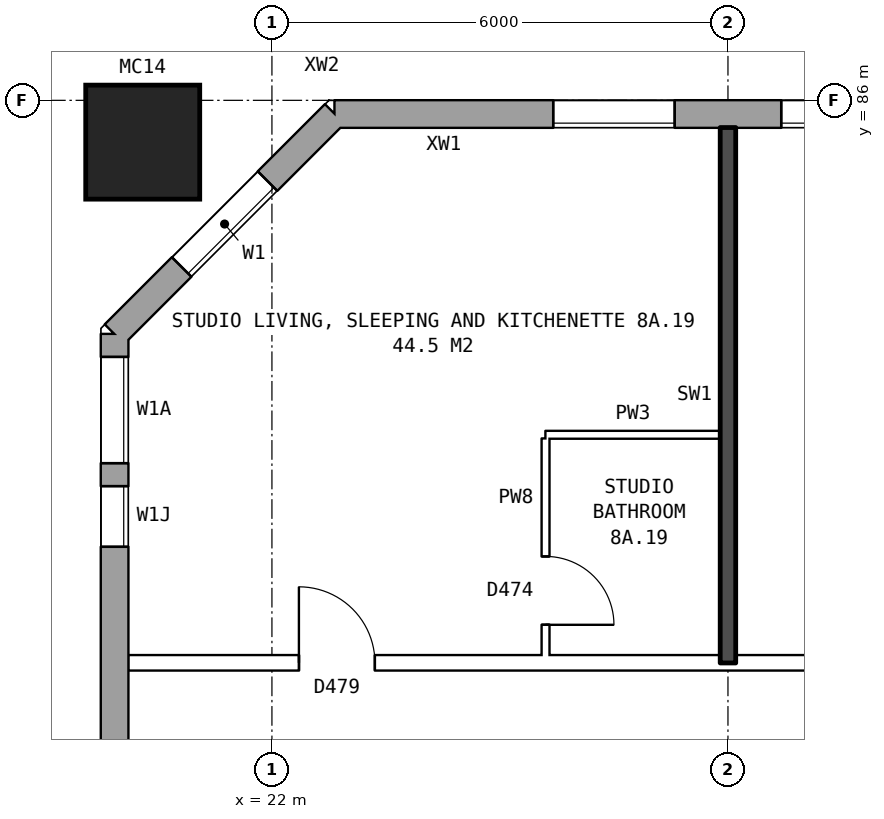
"""IFC4 building model, lengths in metres.
Left out: names, types, materials, properties, quantities, classifications, styles, units other than length and angle.
Written with IfcOpenShell. Run it as: python <this file> out.ifc"""

import sys

from ifc_helpers import new_model, si_unit, direction, frame, frame_2d, origin, origin_2d, place, context, subcontext, project, spatial, rectangle, hollow_rectangle, extrude, element, fill, save


model = new_model("IFC4")
c1 = context("Model", 3, precision=1e-05, world=origin(), true_north=direction((0.0, 1.0)))
c2 = subcontext(c1, "Body", "Model", "MODEL_VIEW")
j1 = project(units=[si_unit("LENGTHUNIT", "METRE"), si_unit("PLANEANGLEUNIT", "RADIAN")], contexts=[c1])
p1 = place(None, origin())
s1 = spatial("IfcSite", under=j1, at=p1, CompositionType="ELEMENT")
p2 = place(p1, origin())
s2 = spatial("IfcBuilding", under=s1, at=p2, CompositionType="ELEMENT")
p3 = place(p2, frame((0.0, 0.0, 31.9)))
s3 = spatial("IfcBuildingStorey", under=s2, at=p3, CompositionType="ELEMENT", Elevation=31.9)
p4 = place(p3, frame((20.3, 85.45, 0.0), z_axis=(0.0, 0.0, 1.0), x_axis=(1.0, 0.0, 0.0)))
e1 = element("IfcColumn", 1, at=p4, inside=s3, PredefinedType="COLUMN", context=c2, shape_type="SweptSolid", body=[
    extrude(hollow_rectangle(XDim=1.5, YDim=1.5, WallThickness=0.08, at=origin_2d()), origin(), (0.0, 0.0, 1.0), 3.1),
])
p5 = place(p3, frame((72.925, 85.82, 0.0), z_axis=(0.0, 0.0, 1.0), x_axis=(-1.0, 0.0, 0.0)))
e2 = element("IfcWall", 2, at=p5, inside=s3, PredefinedType="STANDARD", context=c2, shape_type="SweptSolid", body=[
    extrude(rectangle(XDim=50.101, YDim=0.36, at=frame_2d((25.05, 0.0))), origin(), (0.0, 0.0, 1.0), 2.85),
])
p6 = place(p5, frame((0.625, 0.0, 0.8)))
e3 = element("IfcOpeningElement", 3, at=p6, cuts=e2, PredefinedType="OPENING", context=c2, shape_type="SweptSolid", body=[
    extrude(rectangle(XDim=1.6, YDim=1.8, at=frame_2d((0.8, 0.9))), frame((0.0, 0.19, 0.0), z_axis=(0.0, -1.0, 0.0), x_axis=(1.0, 0.0, 0.0)), (0.0, 0.0, 1.0), 0.38),
])
p7 = place(p5, frame((3.625, 0.0, 0.8)))
e4 = element("IfcOpeningElement", 4, at=p7, cuts=e2, PredefinedType="OPENING", context=c2, shape_type="SweptSolid", body=[
    extrude(rectangle(XDim=1.6, YDim=1.8, at=frame_2d((0.8, 0.9))), frame((0.0, 0.19, 0.0), z_axis=(0.0, -1.0, 0.0), x_axis=(1.0, 0.0, 0.0)), (0.0, 0.0, 1.0), 0.38),
])
p8 = place(p5, frame((6.625, 0.0, 0.8)))
e5 = element("IfcOpeningElement", 5, at=p8, cuts=e2, PredefinedType="OPENING", context=c2, shape_type="SweptSolid", body=[
    extrude(rectangle(XDim=1.6, YDim=1.8, at=frame_2d((0.8, 0.9))), frame((0.0, 0.19, 0.0), z_axis=(0.0, -1.0, 0.0), x_axis=(1.0, 0.0, 0.0)), (0.0, 0.0, 1.0), 0.38),
])
p9 = place(p5, frame((9.625, 0.0, 0.8)))
e6 = element("IfcOpeningElement", 6, at=p9, cuts=e2, PredefinedType="OPENING", context=c2, shape_type="SweptSolid", body=[
    extrude(rectangle(XDim=1.6, YDim=1.8, at=frame_2d((0.8, 0.9))), frame((0.0, 0.19, 0.0), z_axis=(0.0, -1.0, 0.0), x_axis=(1.0, 0.0, 0.0)), (0.0, 0.0, 1.0), 0.38),
])
p10 = place(p5, frame((12.625, 0.0, 0.8)))
e7 = element("IfcOpeningElement", 7, at=p10, cuts=e2, PredefinedType="OPENING", context=c2, shape_type="SweptSolid", body=[
    extrude(rectangle(XDim=1.6, YDim=1.8, at=frame_2d((0.8, 0.9))), frame((0.0, 0.19, 0.0), z_axis=(0.0, -1.0, 0.0), x_axis=(1.0, 0.0, 0.0)), (0.0, 0.0, 1.0), 0.38),
])
p11 = place(p5, frame((15.125, 0.0, 0.8)))
e8 = element("IfcOpeningElement", 8, at=p11, cuts=e2, PredefinedType="OPENING", context=c2, shape_type="SweptSolid", body=[
    extrude(rectangle(XDim=1.6, YDim=1.8, at=frame_2d((0.8, 0.9))), frame((0.0, 0.19, 0.0), z_axis=(0.0, -1.0, 0.0), x_axis=(1.0, 0.0, 0.0)), (0.0, 0.0, 1.0), 0.38),
])
p12 = place(p5, frame((18.575, 0.0, 0.15)))
e9 = element("IfcOpeningElement", 9, at=p12, cuts=e2, PredefinedType="OPENING", context=c2, shape_type="SweptSolid", body=[
    extrude(rectangle(XDim=0.6, YDim=0.9, at=frame_2d((0.3, 0.45))), frame((0.0, 0.19, 0.0), z_axis=(0.0, -1.0, 0.0), x_axis=(1.0, 0.0, 0.0)), (0.0, 0.0, 1.0), 0.38),
])
p13 = place(p5, frame((21.625, 0.0, 0.8)))
e10 = element("IfcOpeningElement", 10, at=p13, cuts=e2, PredefinedType="OPENING", context=c2, shape_type="SweptSolid", body=[
    extrude(rectangle(XDim=1.6, YDim=1.8, at=frame_2d((0.8, 0.9))), frame((0.0, 0.19, 0.0), z_axis=(0.0, -1.0, 0.0), x_axis=(1.0, 0.0, 0.0)), (0.0, 0.0, 1.0), 0.38),
])
p14 = place(p5, frame((24.625, 0.0, 0.8)))
e11 = element("IfcOpeningElement", 11, at=p14, cuts=e2, PredefinedType="OPENING", context=c2, shape_type="SweptSolid", body=[
    extrude(rectangle(XDim=1.6, YDim=1.8, at=frame_2d((0.8, 0.9))), frame((0.0, 0.19, 0.0), z_axis=(0.0, -1.0, 0.0), x_axis=(1.0, 0.0, 0.0)), (0.0, 0.0, 1.0), 0.38),
])
p15 = place(p5, frame((27.625, 0.0, 0.8)))
e12 = element("IfcOpeningElement", 12, at=p15, cuts=e2, PredefinedType="OPENING", context=c2, shape_type="SweptSolid", body=[
    extrude(rectangle(XDim=1.6, YDim=1.8, at=frame_2d((0.8, 0.9))), frame((0.0, 0.19, 0.0), z_axis=(0.0, -1.0, 0.0), x_axis=(1.0, 0.0, 0.0)), (0.0, 0.0, 1.0), 0.38),
])
p16 = place(p5, frame((29.525, 0.0, 0.8)))
e13 = element("IfcOpeningElement", 13, at=p16, cuts=e2, PredefinedType="OPENING", context=c2, shape_type="SweptSolid", body=[
    extrude(rectangle(XDim=1.0, YDim=0.9, at=frame_2d((0.5, 0.45))), frame((0.0, 0.19, 0.0), z_axis=(0.0, -1.0, 0.0), x_axis=(1.0, 0.0, 0.0)), (0.0, 0.0, 1.0), 0.38),
])
p17 = place(p5, frame((33.625, 0.0, 0.8)))
e14 = element("IfcOpeningElement", 14, at=p17, cuts=e2, PredefinedType="OPENING", context=c2, shape_type="SweptSolid", body=[
    extrude(rectangle(XDim=1.6, YDim=1.8, at=frame_2d((0.8, 0.9))), frame((0.0, 0.19, 0.0), z_axis=(0.0, -1.0, 0.0), x_axis=(1.0, 0.0, 0.0)), (0.0, 0.0, 1.0), 0.38),
])
p18 = place(p5, frame((36.625, 0.0, 0.8)))
e15 = element("IfcOpeningElement", 15, at=p18, cuts=e2, PredefinedType="OPENING", context=c2, shape_type="SweptSolid", body=[
    extrude(rectangle(XDim=1.6, YDim=1.8, at=frame_2d((0.8, 0.9))), frame((0.0, 0.19, 0.0), z_axis=(0.0, -1.0, 0.0), x_axis=(1.0, 0.0, 0.0)), (0.0, 0.0, 1.0), 0.38),
])
p19 = place(p5, frame((39.625, 0.0, 0.8)))
e16 = element("IfcOpeningElement", 16, at=p19, cuts=e2, PredefinedType="OPENING", context=c2, shape_type="SweptSolid", body=[
    extrude(rectangle(XDim=1.6, YDim=1.8, at=frame_2d((0.8, 0.9))), frame((0.0, 0.19, 0.0), z_axis=(0.0, -1.0, 0.0), x_axis=(1.0, 0.0, 0.0)), (0.0, 0.0, 1.0), 0.38),
])
p20 = place(p5, frame((42.625, 0.0, 0.8)))
e17 = element("IfcOpeningElement", 17, at=p20, cuts=e2, PredefinedType="OPENING", context=c2, shape_type="SweptSolid", body=[
    extrude(rectangle(XDim=1.6, YDim=1.8, at=frame_2d((0.8, 0.9))), frame((0.0, 0.19, 0.0), z_axis=(0.0, -1.0, 0.0), x_axis=(1.0, 0.0, 0.0)), (0.0, 0.0, 1.0), 0.38),
])
p21 = place(p5, frame((45.625, 0.0, 0.8)))
e18 = element("IfcOpeningElement", 18, at=p21, cuts=e2, PredefinedType="OPENING", context=c2, shape_type="SweptSolid", body=[
    extrude(rectangle(XDim=1.6, YDim=1.8, at=frame_2d((0.8, 0.9))), frame((0.0, 0.19, 0.0), z_axis=(0.0, -1.0, 0.0), x_axis=(1.0, 0.0, 0.0)), (0.0, 0.0, 1.0), 0.38),
])
p22 = place(p5, frame((17.025, 0.0, 1.4)))
e19 = element("IfcOpeningElement", 19, at=p22, cuts=e2, PredefinedType="OPENING", context=c2, shape_type="SweptSolid", body=[
    extrude(rectangle(XDim=0.6, YDim=1.2, at=frame_2d((0.3, 0.6))), frame((0.0, 0.19, 0.0), z_axis=(0.0, -1.0, 0.0), x_axis=(1.0, 0.0, 0.0)), (0.0, 0.0, 1.0), 0.38),
])
p23 = place(p5, frame((19.475, 0.0, 0.15)))
e20 = element("IfcOpeningElement", 20, at=p23, cuts=e2, PredefinedType="OPENING", context=c2, shape_type="SweptSolid", body=[
    extrude(rectangle(XDim=1.2, YDim=1.5, at=frame_2d((0.6, 0.75))), frame((0.0, 0.19, 0.0), z_axis=(0.0, -1.0, 0.0), x_axis=(1.0, 0.0, 0.0)), (0.0, 0.0, 1.0), 0.38),
])
p24 = place(p5, frame((31.975, 0.0, 1.7)))
e21 = element("IfcOpeningElement", 21, at=p24, cuts=e2, PredefinedType="OPENING", context=c2, shape_type="SweptSolid", body=[
    extrude(rectangle(XDim=0.6, YDim=0.9, at=frame_2d((0.3, 0.45))), frame((0.0, 0.19, 0.0), z_axis=(0.0, -1.0, 0.0), x_axis=(1.0, 0.0, 0.0)), (0.0, 0.0, 1.0), 0.38),
])
p25 = place(p3, frame((22.825, 85.82, 0.0), z_axis=(0.0, 0.0, 1.0), x_axis=(-0.707106781187, -0.707106781187, 0.0)))
e22 = element("IfcWall", 22, at=p25, inside=s3, PredefinedType="STANDARD", context=c2, shape_type="SweptSolid", body=[
    extrude(rectangle(XDim=4.094, YDim=0.36, at=frame_2d((2.047, 0.0))), origin(), (0.0, 0.0, 1.0), 2.85),
])
p26 = place(p25, frame((1.247, 0.0, 0.8)))
e23 = element("IfcOpeningElement", 23, at=p26, cuts=e22, PredefinedType="OPENING", context=c2, shape_type="SweptSolid", body=[
    extrude(rectangle(XDim=1.6, YDim=1.8, at=frame_2d((0.8, 0.9))), frame((0.0, 0.19, 0.0), z_axis=(0.0, -1.0, 0.0), x_axis=(1.0, 0.0, 0.0)), (0.0, 0.0, 1.0), 0.38),
])
p27 = place(p3, frame((19.93, 82.925, 0.0), z_axis=(0.0, 0.0, 1.0), x_axis=(0.0, -1.0, 0.0)))
e24 = element("IfcWall", 24, at=p27, inside=s3, PredefinedType="STANDARD", context=c2, shape_type="SweptSolid", body=[
    extrude(rectangle(XDim=25.851, YDim=0.36, at=frame_2d((12.925, 0.0))), origin(), (0.0, 0.0, 1.0), 2.85),
])
p28 = place(p27, frame((0.3, 0.0, 0.8)))
e25 = element("IfcOpeningElement", 25, at=p28, cuts=e24, PredefinedType="OPENING", context=c2, shape_type="SweptSolid", body=[
    extrude(rectangle(XDim=1.4, YDim=1.8, at=frame_2d((0.7, 0.9))), frame((0.0, 0.19, 0.0), z_axis=(0.0, -1.0, 0.0), x_axis=(1.0, 0.0, 0.0)), (0.0, 0.0, 1.0), 0.38),
])
p29 = place(p27, frame((5.575, 0.0, 1.4)))
e26 = element("IfcOpeningElement", 26, at=p29, cuts=e24, PredefinedType="OPENING", context=c2, shape_type="SweptSolid", body=[
    extrude(rectangle(XDim=1.6, YDim=1.2, at=frame_2d((0.8, 0.6))), frame((0.0, 0.19, 0.0), z_axis=(0.0, -1.0, 0.0), x_axis=(1.0, 0.0, 0.0)), (0.0, 0.0, 1.0), 0.38),
])
p30 = place(p27, frame((7.625, 0.0, 0.8)))
e27 = element("IfcOpeningElement", 27, at=p30, cuts=e24, PredefinedType="OPENING", context=c2, shape_type="SweptSolid", body=[
    extrude(rectangle(XDim=1.6, YDim=1.8, at=frame_2d((0.8, 0.9))), frame((0.0, 0.19, 0.0), z_axis=(0.0, -1.0, 0.0), x_axis=(1.0, 0.0, 0.0)), (0.0, 0.0, 1.0), 0.38),
])
p31 = place(p27, frame((10.625, 0.0, 0.8)))
e28 = element("IfcOpeningElement", 28, at=p31, cuts=e24, PredefinedType="OPENING", context=c2, shape_type="SweptSolid", body=[
    extrude(rectangle(XDim=1.6, YDim=1.8, at=frame_2d((0.8, 0.9))), frame((0.0, 0.19, 0.0), z_axis=(0.0, -1.0, 0.0), x_axis=(1.0, 0.0, 0.0)), (0.0, 0.0, 1.0), 0.38),
])
p32 = place(p27, frame((13.625, 0.0, 0.8)))
e29 = element("IfcOpeningElement", 29, at=p32, cuts=e24, PredefinedType="OPENING", context=c2, shape_type="SweptSolid", body=[
    extrude(rectangle(XDim=1.6, YDim=1.8, at=frame_2d((0.8, 0.9))), frame((0.0, 0.19, 0.0), z_axis=(0.0, -1.0, 0.0), x_axis=(1.0, 0.0, 0.0)), (0.0, 0.0, 1.0), 0.38),
])
p33 = place(p27, frame((16.625, 0.0, 0.8)))
e30 = element("IfcOpeningElement", 30, at=p33, cuts=e24, PredefinedType="OPENING", context=c2, shape_type="SweptSolid", body=[
    extrude(rectangle(XDim=1.6, YDim=1.8, at=frame_2d((0.8, 0.9))), frame((0.0, 0.19, 0.0), z_axis=(0.0, -1.0, 0.0), x_axis=(1.0, 0.0, 0.0)), (0.0, 0.0, 1.0), 0.38),
])
p34 = place(p27, frame((9.525, 0.0, 0.8)))
e31 = element("IfcOpeningElement", 31, at=p34, cuts=e24, PredefinedType="OPENING", context=c2, shape_type="SweptSolid", body=[
    extrude(rectangle(XDim=0.8, YDim=1.8, at=frame_2d((0.4, 0.9))), frame((0.0, 0.19, 0.0), z_axis=(0.0, -1.0, 0.0), x_axis=(1.0, 0.0, 0.0)), (0.0, 0.0, 1.0), 0.38),
])
p35 = place(p27, frame((22.525, 0.0, 0.8)))
e32 = element("IfcOpeningElement", 32, at=p35, cuts=e24, PredefinedType="OPENING", context=c2, shape_type="SweptSolid", body=[
    extrude(rectangle(XDim=1.0, YDim=1.2, at=frame_2d((0.5, 0.6))), frame((0.0, 0.19, 0.0), z_axis=(0.0, -1.0, 0.0), x_axis=(1.0, 0.0, 0.0)), (0.0, 0.0, 1.0), 0.38),
])
p36 = place(p27, frame((2.0, 0.0, 0.8)))
e33 = element("IfcOpeningElement", 33, at=p36, cuts=e24, PredefinedType="OPENING", context=c2, shape_type="SweptSolid", body=[
    extrude(rectangle(XDim=0.8, YDim=1.5, at=frame_2d((0.4, 0.75))), frame((0.0, 0.19, 0.0), z_axis=(0.0, -1.0, 0.0), x_axis=(1.0, 0.0, 0.0)), (0.0, 0.0, 1.0), 0.38),
])
p37 = place(p27, frame((12.525, 0.0, 0.8)))
e34 = element("IfcOpeningElement", 34, at=p37, cuts=e24, PredefinedType="OPENING", context=c2, shape_type="SweptSolid", body=[
    extrude(rectangle(XDim=0.8, YDim=1.8, at=frame_2d((0.4, 0.9))), frame((0.0, 0.19, 0.0), z_axis=(0.0, -1.0, 0.0), x_axis=(1.0, 0.0, 0.0)), (0.0, 0.0, 1.0), 0.38),
])
p38 = place(p27, frame((15.525, 0.0, 0.8)))
e35 = element("IfcOpeningElement", 35, at=p38, cuts=e24, PredefinedType="OPENING", context=c2, shape_type="SweptSolid", body=[
    extrude(rectangle(XDim=0.8, YDim=1.8, at=frame_2d((0.4, 0.9))), frame((0.0, 0.19, 0.0), z_axis=(0.0, -1.0, 0.0), x_axis=(1.0, 0.0, 0.0)), (0.0, 0.0, 1.0), 0.38),
])
p39 = place(p27, frame((18.525, 0.0, 0.9)))
e36 = element("IfcOpeningElement", 36, at=p39, cuts=e24, PredefinedType="OPENING", context=c2, shape_type="SweptSolid", body=[
    extrude(rectangle(XDim=0.8, YDim=1.5, at=frame_2d((0.4, 0.75))), frame((0.0, 0.19, 0.0), z_axis=(0.0, -1.0, 0.0), x_axis=(1.0, 0.0, 0.0)), (0.0, 0.0, 1.0), 0.38),
])
p40 = place(p27, frame((23.825, 0.0, 0.8)))
e37 = element("IfcOpeningElement", 37, at=p40, cuts=e24, PredefinedType="OPENING", context=c2, shape_type="SweptSolid", body=[
    extrude(rectangle(XDim=1.4, YDim=1.8, at=frame_2d((0.7, 0.9))), frame((0.0, 0.19, 0.0), z_axis=(0.0, -1.0, 0.0), x_axis=(1.0, 0.0, 0.0)), (0.0, 0.0, 1.0), 0.38),
])
p41 = place(p3, frame((20.11, 78.6, 0.0), z_axis=(0.0, 0.0, 1.0), x_axis=(1.0, 0.0, 0.0)))
e38 = element("IfcWall", 38, at=p41, inside=s3, PredefinedType="PARTITIONING", context=c2, shape_type="SweptSolid", body=[
    extrude(rectangle(XDim=25.79, YDim=0.2, at=frame_2d((12.895, 0.0))), origin(), (0.0, 0.0, 1.0), 2.85),
])
p42 = place(p41, frame((22.34, 0.0, 0.0)))
e39 = element("IfcOpeningElement", 39, at=p42, cuts=e38, PredefinedType="OPENING", context=c2, shape_type="SweptSolid", body=[
    extrude(rectangle(XDim=1.0, YDim=2.1, at=frame_2d((0.5, 1.05))), frame((0.0, 0.11, 0.0), z_axis=(0.0, -1.0, 0.0), x_axis=(1.0, 0.0, 0.0)), (0.0, 0.0, 1.0), 0.22),
])
p43 = place(p41, frame((10.39, 0.0, 0.0)))
e40 = element("IfcOpeningElement", 40, at=p43, cuts=e38, PredefinedType="OPENING", context=c2, shape_type="SweptSolid", body=[
    extrude(rectangle(XDim=1.0, YDim=2.1, at=frame_2d((0.5, 1.05))), frame((0.0, 0.11, 0.0), z_axis=(0.0, -1.0, 0.0), x_axis=(1.0, 0.0, 0.0)), (0.0, 0.0, 1.0), 0.22),
])
p44 = place(p41, frame((2.245, 0.0, 0.0)))
e41 = element("IfcOpeningElement", 41, at=p44, cuts=e38, PredefinedType="OPENING", context=c2, shape_type="SweptSolid", body=[
    extrude(rectangle(XDim=1.0, YDim=2.1, at=frame_2d((0.5, 1.05))), frame((0.0, 0.11, 0.0), z_axis=(0.0, -1.0, 0.0), x_axis=(1.0, 0.0, 0.0)), (0.0, 0.0, 1.0), 0.22),
])
p45 = place(p3, frame((25.6, 81.6, 0.0), z_axis=(0.0, 0.0, 1.0), x_axis=(1.0, 0.0, 0.0)))
e42 = element("IfcWall", 42, at=p45, inside=s3, PredefinedType="PARTITIONING", context=c2, shape_type="SweptSolid", body=[
    extrude(rectangle(XDim=2.3, YDim=0.1, at=frame_2d((1.15, 0.0))), origin(), (0.0, 0.0, 1.0), 2.85),
])
p46 = place(p3, frame((25.6, 78.7, 0.0), z_axis=(0.0, 0.0, 1.0), x_axis=(0.0, 1.0, 0.0)))
e43 = element("IfcWall", 43, at=p46, inside=s3, PredefinedType="PARTITIONING", context=c2, shape_type="SweptSolid", body=[
    extrude(rectangle(XDim=2.85, YDim=0.1, at=frame_2d((1.425, 0.0))), origin(), (0.0, 0.0, 1.0), 2.85),
])
p47 = place(p46, frame((0.4, 0.0, 0.0)))
e44 = element("IfcOpeningElement", 44, at=p47, cuts=e43, PredefinedType="OPENING", context=c2, shape_type="SweptSolid", body=[
    extrude(rectangle(XDim=0.9, YDim=2.1, at=frame_2d((0.45, 1.05))), frame((0.0, 0.06, 0.0), z_axis=(0.0, -1.0, 0.0), x_axis=(1.0, 0.0, 0.0)), (0.0, 0.0, 1.0), 0.12),
])
p48 = place(p3, frame((28.0, 78.6, 0.0), z_axis=(0.0, 0.0, 1.0), x_axis=(0.0, 1.0, 0.0)))
e45 = element("IfcWall", 45, at=p48, inside=s3, PredefinedType="SOLIDWALL", context=c2, shape_type="SweptSolid", body=[
    extrude(rectangle(XDim=7.04, YDim=0.2, at=frame_2d((3.52, 0.0))), origin(), (0.0, 0.0, 1.0), 2.85),
])
p49 = place(p20, origin())
e46 = element("IfcWindow", 46, at=p49, inside=s3, PartitioningType="SINGLE_PANEL", PredefinedType="WINDOW", context=c2, shape_type="SweptSolid", body=[
    extrude(rectangle(XDim=1.6, YDim=1.8, at=frame_2d((0.8, 0.9))), frame((0.0, 0.15, 0.0), z_axis=(0.0, -1.0, 0.0), x_axis=(1.0, 0.0, 0.0)), (0.0, 0.0, 1.0), 0.06),
])
fill(e17, e46)
p50 = place(p21, origin())
e47 = element("IfcWindow", 47, at=p50, inside=s3, PartitioningType="SINGLE_PANEL", PredefinedType="WINDOW", context=c2, shape_type="SweptSolid", body=[
    extrude(rectangle(XDim=1.6, YDim=1.8, at=frame_2d((0.8, 0.9))), frame((0.0, 0.15, 0.0), z_axis=(0.0, -1.0, 0.0), x_axis=(1.0, 0.0, 0.0)), (0.0, 0.0, 1.0), 0.06),
])
fill(e18, e47)
p51 = place(p26, origin())
e48 = element("IfcWindow", 48, at=p51, inside=s3, PartitioningType="SINGLE_PANEL", PredefinedType="WINDOW", context=c2, shape_type="SweptSolid", body=[
    extrude(rectangle(XDim=1.6, YDim=1.8, at=frame_2d((0.8, 0.9))), frame((0.0, 0.15, 0.0), z_axis=(0.0, -1.0, 0.0), x_axis=(1.0, 0.0, 0.0)), (0.0, 0.0, 1.0), 0.06),
])
fill(e23, e48)
p52 = place(p28, origin())
e49 = element("IfcWindow", 49, at=p52, inside=s3, PartitioningType="SINGLE_PANEL", PredefinedType="WINDOW", context=c2, shape_type="SweptSolid", body=[
    extrude(rectangle(XDim=1.4, YDim=1.8, at=frame_2d((0.7, 0.9))), frame((0.0, 0.15, 0.0), z_axis=(0.0, -1.0, 0.0), x_axis=(1.0, 0.0, 0.0)), (0.0, 0.0, 1.0), 0.06),
])
fill(e25, e49)
p53 = place(p44, origin())
e50 = element("IfcDoor", 50, at=p53, inside=s3, OperationType="SINGLE_SWING_LEFT", PredefinedType="DOOR", context=c2, shape_type="SweptSolid", body=[
    extrude(rectangle(XDim=1.0, YDim=2.1, at=frame_2d((0.5, 1.05))), frame((0.0, 0.025, 0.0), z_axis=(0.0, -1.0, 0.0), x_axis=(1.0, 0.0, 0.0)), (0.0, 0.0, 1.0), 0.05),
])
fill(e41, e50)
p54 = place(p47, frame((0.9, 0.0, 0.0), z_axis=(0.0, 0.0, 1.0), x_axis=(-1.0, 0.0, 0.0)))
e51 = element("IfcDoor", 51, at=p54, inside=s3, OperationType="SINGLE_SWING_RIGHT", PredefinedType="DOOR", context=c2, shape_type="SweptSolid", body=[
    extrude(rectangle(XDim=0.9, YDim=2.1, at=frame_2d((0.45, 1.05))), frame((0.0, 0.025, 0.0), z_axis=(0.0, -1.0, 0.0), x_axis=(1.0, 0.0, 0.0)), (0.0, 0.0, 1.0), 0.05),
])
fill(e44, e51)
p55 = place(p36, origin())
e52 = element("IfcWindow", 52, at=p55, inside=s3, PartitioningType="SINGLE_PANEL", PredefinedType="WINDOW", context=c2, shape_type="SweptSolid", body=[
    extrude(rectangle(XDim=0.8, YDim=1.5, at=frame_2d((0.4, 0.75))), frame((0.0, 0.15, 0.0), z_axis=(0.0, -1.0, 0.0), x_axis=(1.0, 0.0, 0.0)), (0.0, 0.0, 1.0), 0.06),
])
fill(e33, e52)
save(model, sys.argv[1])
